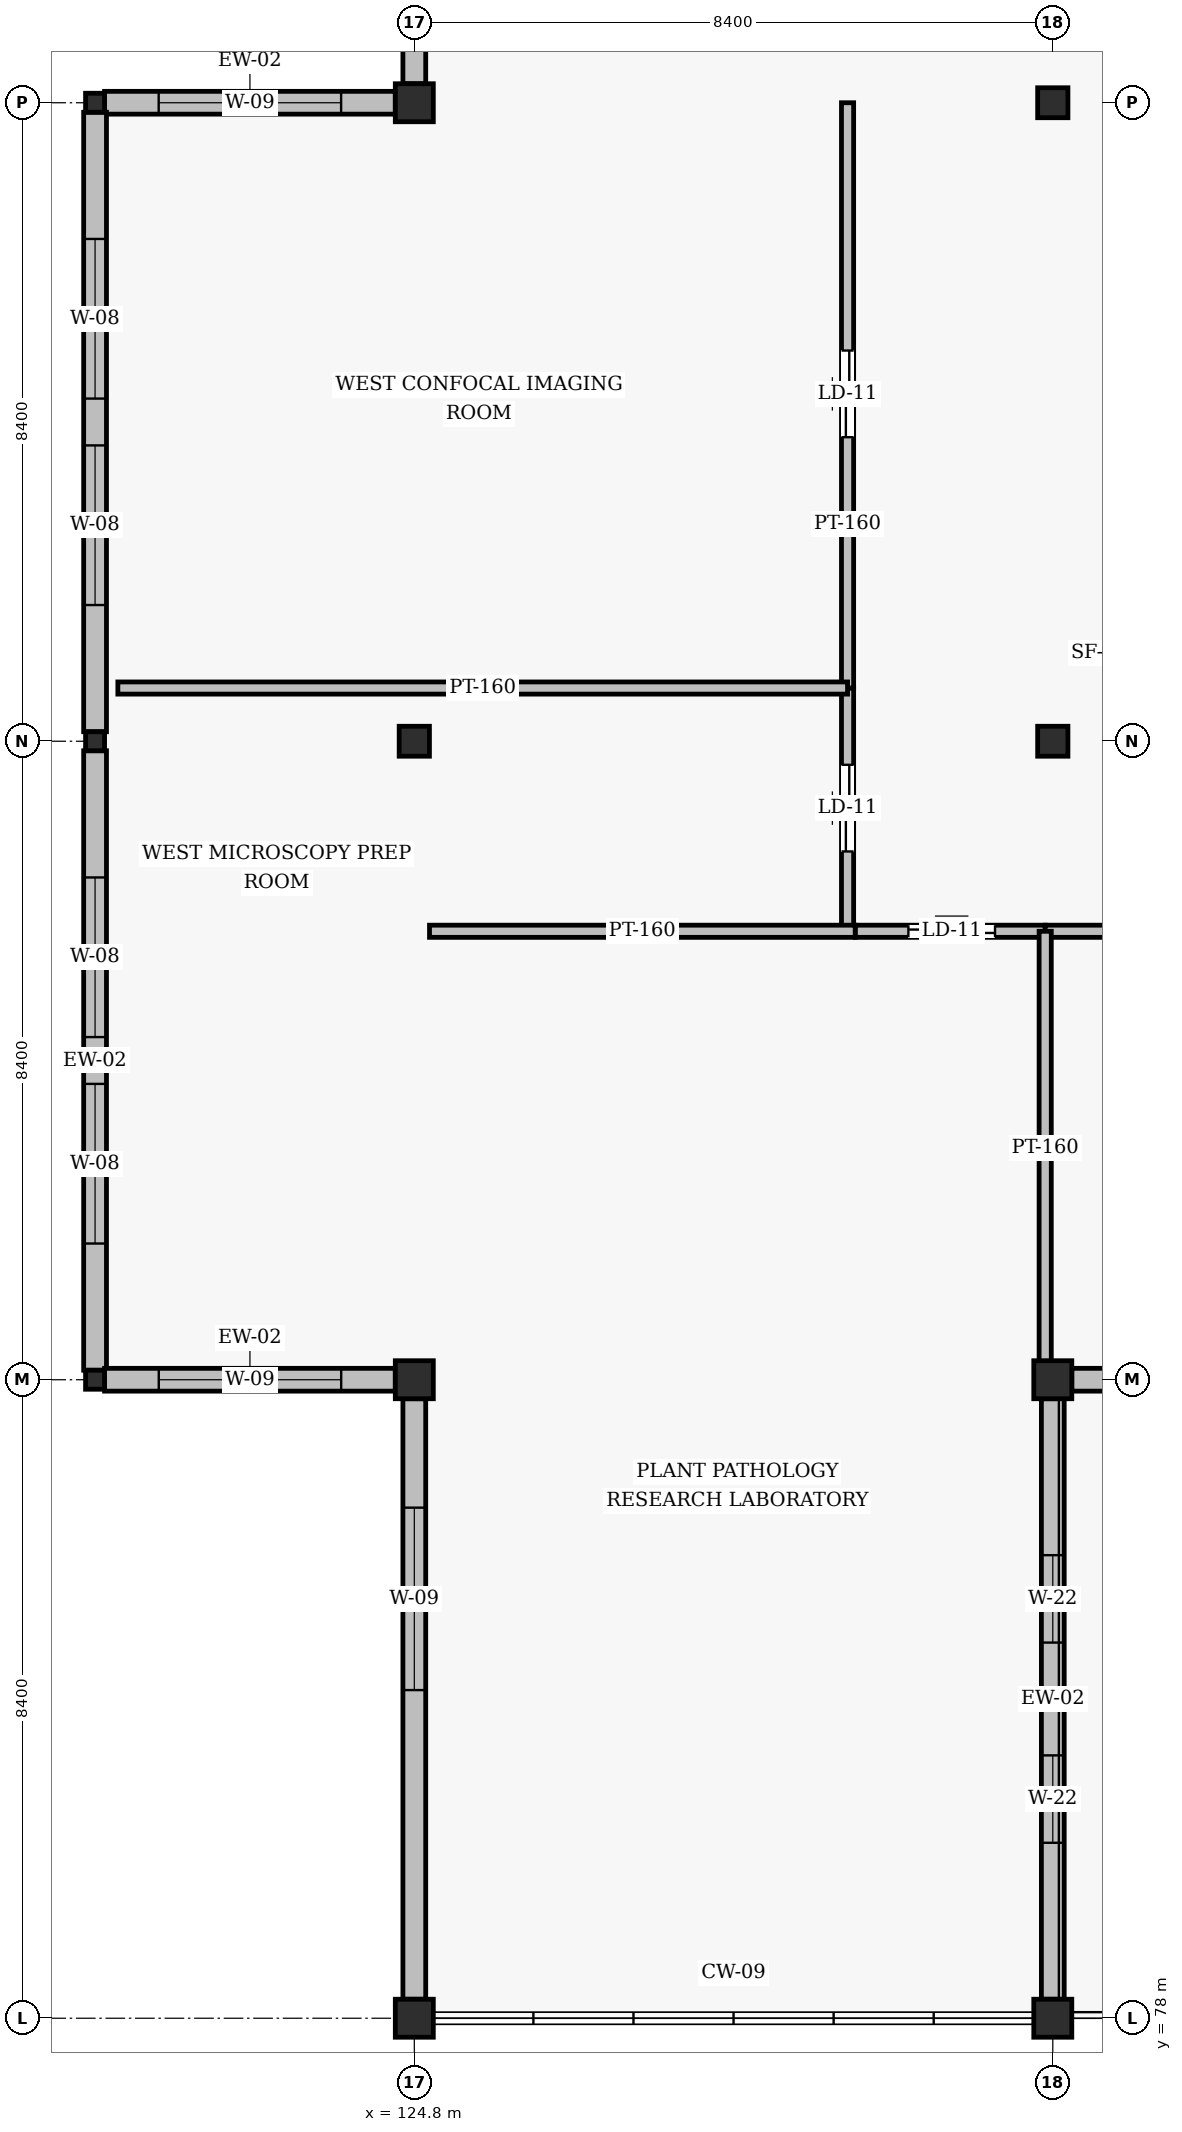
"""IFC4 building model, lengths in metres.
Left out: names, types, materials, properties, quantities, classifications, styles, units other than length and angle.
Written with IfcOpenShell. Run it as: python <this file> out.ifc"""

import sys

from ifc_helpers import new_model, si_unit, direction, frame, frame_2d, origin, origin_2d, place, context, subcontext, project, spatial, rectangle, hollow_rectangle, i_section, extrude, element, fill, save


model = new_model("IFC4")
c1 = context("Model", 3, precision=1e-05, world=origin(), true_north=direction((0.0, 1.0)))
c2 = subcontext(c1, "Body", "Model", "MODEL_VIEW")
j1 = project(units=[si_unit("LENGTHUNIT", "METRE"), si_unit("PLANEANGLEUNIT", "RADIAN")], contexts=[c1])
p1 = place(None, origin())
s1 = spatial("IfcSite", under=j1, at=p1, CompositionType="ELEMENT")
p2 = place(p1, origin())
s2 = spatial("IfcBuilding", under=s1, at=p2, CompositionType="ELEMENT")
p3 = place(p2, frame((0.0, 0.0, 28.2)))
s3 = spatial("IfcBuildingStorey", under=s2, at=p3, CompositionType="ELEMENT", Elevation=28.2)
for number, where, z_axis, x_axis in (
    (1, (120.6, 86.4, 0.0), (0.0, 0.0, 1.0), (1.0, 0.0, 0.0)),
    (2, (120.6, 94.8, 0.0), (0.0, 0.0, 1.0), (1.0, 0.0, 0.0)),
    (3, (120.6, 103.2, 0.0), (0.0, 0.0, 1.0), (1.0, 0.0, 0.0)),
):
    element("IfcColumn", number, at=place(p3, frame(where, z_axis=z_axis, x_axis=x_axis)), inside=s3, PredefinedType="COLUMN", context=c2, shape_type="SweptSolid", body=[
        extrude(i_section(OverallWidth=0.25, OverallDepth=0.25, WebThickness=0.009, FlangeThickness=0.014, FilletRadius=0.016, at=origin_2d()), origin(), (0.0, 0.0, 1.0), 3.6),
    ])
for number, where, z_axis, x_axis in (
    (4, (124.8, 78.0, 0.0), (0.0, 0.0, 1.0), (1.0, 0.0, 0.0)),
    (5, (124.8, 86.4, 0.0), (0.0, 0.0, 1.0), (1.0, 0.0, 0.0)),
):
    element("IfcColumn", number, at=place(p3, frame(where, z_axis=z_axis, x_axis=x_axis)), inside=s3, PredefinedType="COLUMN", context=c2, shape_type="SweptSolid", body=[
        extrude(hollow_rectangle(XDim=0.5, YDim=0.5, WallThickness=0.02, InnerFilletRadius=0.02, OuterFilletRadius=0.04, at=origin_2d()), origin(), (0.0, 0.0, 1.0), 3.6),
    ])
p4 = place(p3, frame((124.8, 94.8, 0.0), z_axis=(0.0, 0.0, 1.0), x_axis=(1.0, 0.0, 0.0)))
e6 = element("IfcColumn", 6, at=p4, inside=s3, PredefinedType="COLUMN", context=c2, shape_type="SweptSolid", body=[
    extrude(i_section(OverallWidth=0.398, OverallDepth=0.394, WebThickness=0.011, FlangeThickness=0.018, FilletRadius=0.022, at=origin_2d()), origin(), (0.0, 0.0, 1.0), 3.6),
])
for number, where, z_axis, x_axis in (
    (7, (124.8, 103.2, 0.0), (0.0, 0.0, 1.0), (1.0, 0.0, 0.0)),
    (8, (133.2, 78.0, 0.0), (0.0, 0.0, 1.0), (1.0, 0.0, 0.0)),
    (9, (133.2, 86.4, 0.0), (0.0, 0.0, 1.0), (1.0, 0.0, 0.0)),
):
    element("IfcColumn", number, at=place(p3, frame(where, z_axis=z_axis, x_axis=x_axis)), inside=s3, PredefinedType="COLUMN", context=c2, shape_type="SweptSolid", body=[
        extrude(hollow_rectangle(XDim=0.5, YDim=0.5, WallThickness=0.02, InnerFilletRadius=0.02, OuterFilletRadius=0.04, at=origin_2d()), origin(), (0.0, 0.0, 1.0), 3.6),
    ])
for number, where, z_axis, x_axis in (
    (10, (133.2, 94.8, 0.0), (0.0, 0.0, 1.0), (1.0, 0.0, 0.0)),
    (11, (133.2, 103.2, 0.0), (0.0, 0.0, 1.0), (1.0, 0.0, 0.0)),
):
    element("IfcColumn", number, at=place(p3, frame(where, z_axis=z_axis, x_axis=x_axis)), inside=s3, PredefinedType="COLUMN", context=c2, shape_type="SweptSolid", body=[
        extrude(i_section(OverallWidth=0.398, OverallDepth=0.394, WebThickness=0.011, FlangeThickness=0.018, FilletRadius=0.022, at=origin_2d()), origin(), (0.0, 0.0, 1.0), 3.6),
    ])
p5 = place(p3, frame((124.8, 86.15, 0.0), z_axis=(0.0, 0.0, 1.0), x_axis=(0.0, -1.0, 0.0)))
e12 = element("IfcWall", 12, at=p5, inside=s3, PredefinedType="SOLIDWALL", context=c2, shape_type="SweptSolid", body=[
    extrude(rectangle(XDim=7.9, YDim=0.3, at=frame_2d((3.95, 0.0))), origin(), (0.0, 0.0, 1.0), 2.852),
])
p6 = place(p5, frame((1.433, 0.0, 0.85)))
e13 = element("IfcOpeningElement", 13, at=p6, cuts=e12, PredefinedType="OPENING", context=c2, shape_type="SweptSolid", body=[
    extrude(rectangle(XDim=2.4, YDim=1.7, at=frame_2d((1.2, 0.85))), frame((0.0, 0.16, 0.0), z_axis=(0.0, -1.0, 0.0), x_axis=(1.0, 0.0, 0.0)), (0.0, 0.0, 1.0), 0.32),
])
p7 = place(p3, frame((133.2, 78.25, 0.0), z_axis=(0.0, 0.0, 1.0), x_axis=(0.0, 1.0, 0.0)))
e14 = element("IfcWall", 14, at=p7, inside=s3, PredefinedType="SOLIDWALL", context=c2, shape_type="SweptSolid", body=[
    extrude(rectangle(XDim=7.9, YDim=0.3, at=frame_2d((3.95, 0.0))), origin(), (0.0, 0.0, 1.0), 2.852),
])
p8 = place(p7, frame((2.058, 0.0, 0.9)))
e15 = element("IfcOpeningElement", 15, at=p8, cuts=e14, PredefinedType="OPENING", context=c2, shape_type="SweptSolid", body=[
    extrude(rectangle(XDim=1.15, YDim=1.65, at=frame_2d((0.575, 0.825))), frame((0.0, 0.16, 0.0), z_axis=(0.0, -1.0, 0.0), x_axis=(1.0, 0.0, 0.0)), (0.0, 0.0, 1.0), 0.32),
])
p9 = place(p7, frame((4.692, 0.0, 0.9)))
e16 = element("IfcOpeningElement", 16, at=p9, cuts=e14, PredefinedType="OPENING", context=c2, shape_type="SweptSolid", body=[
    extrude(rectangle(XDim=1.15, YDim=1.65, at=frame_2d((0.575, 0.825))), frame((0.0, 0.16, 0.0), z_axis=(0.0, -1.0, 0.0), x_axis=(1.0, 0.0, 0.0)), (0.0, 0.0, 1.0), 0.32),
])
p10 = place(p3, frame((133.45, 86.4, 0.0), z_axis=(0.0, 0.0, 1.0), x_axis=(1.0, 0.0, 0.0)))
e17 = element("IfcWall", 17, at=p10, inside=s3, PredefinedType="SOLIDWALL", context=c2, shape_type="SweptSolid", body=[
    extrude(rectangle(XDim=7.9, YDim=0.3, at=frame_2d((3.95, 0.0))), origin(), (0.0, 0.0, 1.0), 2.852),
])
p11 = place(p10, frame((3.275, 0.0, 0.0)))
e18 = element("IfcOpeningElement", 18, at=p11, cuts=e17, PredefinedType="OPENING", context=c2, shape_type="SweptSolid", body=[
    extrude(rectangle(XDim=1.35, YDim=2.24, at=frame_2d((0.675, 1.12))), frame((0.0, 0.16, 0.0), z_axis=(0.0, -1.0, 0.0), x_axis=(1.0, 0.0, 0.0)), (0.0, 0.0, 1.0), 0.32),
])
p12 = place(p3, frame((124.8, 114.95, 0.0), z_axis=(0.0, 0.0, 1.0), x_axis=(0.0, -1.0, 0.0)))
e19 = element("IfcWall", 19, at=p12, inside=s3, PredefinedType="SOLIDWALL", context=c2, shape_type="SweptSolid", body=[
    extrude(rectangle(XDim=11.5, YDim=0.3, at=frame_2d((5.75, 0.0))), origin(), (0.0, 0.0, 1.0), 2.56),
])
p13 = place(p3, frame((124.55, 103.2, 0.0), z_axis=(0.0, 0.0, 1.0), x_axis=(-1.0, 0.0, 0.0)))
e20 = element("IfcWall", 20, at=p13, inside=s3, PredefinedType="SOLIDWALL", context=c2, shape_type="SweptSolid", body=[
    extrude(rectangle(XDim=3.825, YDim=0.3, at=frame_2d((1.913, 0.0))), origin(), (0.0, 0.0, 1.0), 2.858),
])
p14 = place(p13, frame((0.713, 0.0, 0.85)))
e21 = element("IfcOpeningElement", 21, at=p14, cuts=e20, PredefinedType="OPENING", context=c2, shape_type="SweptSolid", body=[
    extrude(rectangle(XDim=2.4, YDim=1.71, at=frame_2d((1.2, 0.855))), frame((0.0, 0.16, 0.0), z_axis=(0.0, -1.0, 0.0), x_axis=(1.0, 0.0, 0.0)), (0.0, 0.0, 1.0), 0.32),
])
p15 = place(p3, frame((120.6, 103.075, 0.0), z_axis=(0.0, 0.0, 1.0), x_axis=(0.0, -1.0, 0.0)))
e22 = element("IfcWall", 22, at=p15, inside=s3, PredefinedType="SOLIDWALL", context=c2, shape_type="SweptSolid", body=[
    extrude(rectangle(XDim=8.15, YDim=0.3, at=frame_2d((4.075, 0.0))), origin(), (0.0, 0.0, 1.0), 2.852),
])
p16 = place(p15, frame((1.667, 0.0, 0.85)))
e23 = element("IfcOpeningElement", 23, at=p16, cuts=e22, PredefinedType="OPENING", context=c2, shape_type="SweptSolid", body=[
    extrude(rectangle(XDim=2.1, YDim=1.7, at=frame_2d((1.05, 0.85))), frame((0.0, 0.16, 0.0), z_axis=(0.0, -1.0, 0.0), x_axis=(1.0, 0.0, 0.0)), (0.0, 0.0, 1.0), 0.32),
])
p17 = place(p15, frame((4.383, 0.0, 0.85)))
e24 = element("IfcOpeningElement", 24, at=p17, cuts=e22, PredefinedType="OPENING", context=c2, shape_type="SweptSolid", body=[
    extrude(rectangle(XDim=2.1, YDim=1.7, at=frame_2d((1.05, 0.85))), frame((0.0, 0.16, 0.0), z_axis=(0.0, -1.0, 0.0), x_axis=(1.0, 0.0, 0.0)), (0.0, 0.0, 1.0), 0.32),
])
p18 = place(p3, frame((120.6, 94.675, 0.0), z_axis=(0.0, 0.0, 1.0), x_axis=(0.0, -1.0, 0.0)))
e25 = element("IfcWall", 25, at=p18, inside=s3, PredefinedType="SOLIDWALL", context=c2, shape_type="SweptSolid", body=[
    extrude(rectangle(XDim=8.15, YDim=0.3, at=frame_2d((4.075, 0.0))), origin(), (0.0, 0.0, 1.0), 2.852),
])
p19 = place(p18, frame((1.667, 0.0, 0.85)))
e26 = element("IfcOpeningElement", 26, at=p19, cuts=e25, PredefinedType="OPENING", context=c2, shape_type="SweptSolid", body=[
    extrude(rectangle(XDim=2.1, YDim=1.7, at=frame_2d((1.05, 0.85))), frame((0.0, 0.16, 0.0), z_axis=(0.0, -1.0, 0.0), x_axis=(1.0, 0.0, 0.0)), (0.0, 0.0, 1.0), 0.32),
])
p20 = place(p18, frame((4.383, 0.0, 0.85)))
e27 = element("IfcOpeningElement", 27, at=p20, cuts=e25, PredefinedType="OPENING", context=c2, shape_type="SweptSolid", body=[
    extrude(rectangle(XDim=2.1, YDim=1.7, at=frame_2d((1.05, 0.85))), frame((0.0, 0.16, 0.0), z_axis=(0.0, -1.0, 0.0), x_axis=(1.0, 0.0, 0.0)), (0.0, 0.0, 1.0), 0.32),
])
p21 = place(p3, frame((120.725, 86.4, 0.0), z_axis=(0.0, 0.0, 1.0), x_axis=(1.0, 0.0, 0.0)))
e28 = element("IfcWall", 28, at=p21, inside=s3, PredefinedType="SOLIDWALL", context=c2, shape_type="SweptSolid", body=[
    extrude(rectangle(XDim=3.825, YDim=0.3, at=frame_2d((1.913, 0.0))), origin(), (0.0, 0.0, 1.0), 2.858),
])
p22 = place(p21, frame((0.713, 0.0, 0.85)))
e29 = element("IfcOpeningElement", 29, at=p22, cuts=e28, PredefinedType="OPENING", context=c2, shape_type="SweptSolid", body=[
    extrude(rectangle(XDim=2.4, YDim=1.71, at=frame_2d((1.2, 0.855))), frame((0.0, 0.16, 0.0), z_axis=(0.0, -1.0, 0.0), x_axis=(1.0, 0.0, 0.0)), (0.0, 0.0, 1.0), 0.32),
])
p23 = place(p3, frame((130.5, 92.3, 0.0), z_axis=(0.0, 0.0, 1.0), x_axis=(0.0, 1.0, 0.0)))
e30 = element("IfcWall", 30, at=p23, inside=s3, PredefinedType="PARTITIONING", context=c2, shape_type="SweptSolid", body=[
    extrude(rectangle(XDim=3.2, YDim=0.16, at=frame_2d((1.6, 0.0))), origin(), (0.0, 0.0, 1.0), 2.856),
])
p24 = place(p23, frame((1.05, 0.0, 0.0)))
e31 = element("IfcOpeningElement", 31, at=p24, cuts=e30, PredefinedType="OPENING", context=c2, shape_type="SweptSolid", body=[
    extrude(rectangle(XDim=1.14, YDim=2.12, at=frame_2d((0.57, 1.06))), frame((0.0, 0.09, 0.0), z_axis=(0.0, -1.0, 0.0), x_axis=(1.0, 0.0, 0.0)), (0.0, 0.0, 1.0), 0.18),
])
p25 = place(p3, frame((130.5, 95.5, 0.0), z_axis=(0.0, 0.0, 1.0), x_axis=(0.0, 1.0, 0.0)))
e32 = element("IfcWall", 32, at=p25, inside=s3, PredefinedType="PARTITIONING", context=c2, shape_type="SweptSolid", body=[
    extrude(rectangle(XDim=7.7, YDim=0.16, at=frame_2d((3.85, 0.0))), origin(), (0.0, 0.0, 1.0), 3.006),
])
p26 = place(p25, frame((3.3, 0.0, 0.0)))
e33 = element("IfcOpeningElement", 33, at=p26, cuts=e32, PredefinedType="OPENING", context=c2, shape_type="SweptSolid", body=[
    extrude(rectangle(XDim=1.14, YDim=2.12, at=frame_2d((0.57, 1.06))), frame((0.0, 0.09, 0.0), z_axis=(0.0, -1.0, 0.0), x_axis=(1.0, 0.0, 0.0)), (0.0, 0.0, 1.0), 0.18),
])
p27 = place(p3, frame((120.9, 95.5, 0.0), z_axis=(0.0, 0.0, 1.0), x_axis=(1.0, 0.0, 0.0)))
e34 = element("IfcWall", 34, at=p27, inside=s3, PredefinedType="PARTITIONING", context=c2, shape_type="SweptSolid", body=[
    extrude(rectangle(XDim=9.6, YDim=0.16, at=frame_2d((4.8, 0.0))), origin(), (0.0, 0.0, 1.0), 2.852),
])
p28 = place(p3, frame((130.6, 92.3, 0.0), z_axis=(0.0, 0.0, 1.0), x_axis=(1.0, 0.0, 0.0)))
e35 = element("IfcWall", 35, at=p28, inside=s3, PredefinedType="PARTITIONING", context=c2, shape_type="SweptSolid", body=[
    extrude(rectangle(XDim=2.5, YDim=0.16, at=frame_2d((1.25, 0.0))), origin(), (0.0, 0.0, 1.0), 3.352),
])
p29 = place(p28, frame((0.7, 0.0, 0.0)))
e36 = element("IfcOpeningElement", 36, at=p29, cuts=e35, PredefinedType="OPENING", context=c2, shape_type="SweptSolid", body=[
    extrude(rectangle(XDim=1.14, YDim=2.12, at=frame_2d((0.57, 1.06))), frame((0.0, 0.09, 0.0), z_axis=(0.0, -1.0, 0.0), x_axis=(1.0, 0.0, 0.0)), (0.0, 0.0, 1.0), 0.18),
])
p30 = place(p3, frame((133.1, 92.3, 0.0), z_axis=(0.0, 0.0, 1.0), x_axis=(1.0, 0.0, 0.0)))
e37 = element("IfcWall", 37, at=p30, inside=s3, PredefinedType="PARTITIONING", context=c2, shape_type="SweptSolid", body=[
    extrude(rectangle(XDim=16.9, YDim=0.16, at=frame_2d((8.45, 0.0))), origin(), (0.0, 0.0, 1.0), 2.852),
])
p31 = place(p30, frame((7.85, 0.0, 0.0)))
e38 = element("IfcOpeningElement", 38, at=p31, cuts=e37, PredefinedType="OPENING", context=c2, shape_type="SweptSolid", body=[
    extrude(rectangle(XDim=1.25, YDim=2.12, at=frame_2d((0.625, 1.06))), frame((0.0, 0.09, 0.0), z_axis=(0.0, -1.0, 0.0), x_axis=(1.0, 0.0, 0.0)), (0.0, 0.0, 1.0), 0.18),
])
p32 = place(p3, frame((125.0, 92.3, 0.0), z_axis=(0.0, 0.0, 1.0), x_axis=(1.0, 0.0, 0.0)))
e39 = element("IfcWall", 39, at=p32, inside=s3, PredefinedType="PARTITIONING", context=c2, shape_type="SweptSolid", body=[
    extrude(rectangle(XDim=5.6, YDim=0.16, at=frame_2d((2.8, 0.0))), origin(), (0.0, 0.0, 1.0), 3.352),
])
p33 = place(p3, frame((133.1, 86.6, 0.0), z_axis=(0.0, 0.0, 1.0), x_axis=(0.0, 1.0, 0.0)))
e40 = element("IfcWall", 40, at=p33, inside=s3, PredefinedType="PARTITIONING", context=c2, shape_type="SweptSolid", body=[
    extrude(rectangle(XDim=5.7, YDim=0.16, at=frame_2d((2.85, 0.0))), origin(), (0.0, 0.0, 1.0), 2.852),
])
p34 = place(p6, origin())
e41 = element("IfcWindow", 41, at=p34, inside=s3, PartitioningType="SINGLE_PANEL", PredefinedType="WINDOW", context=c2, shape_type="SweptSolid", body=[
    extrude(rectangle(XDim=2.4, YDim=1.7, at=frame_2d((1.2, 0.85))), frame((0.0, 0.03, 0.0), z_axis=(0.0, -1.0, 0.0), x_axis=(1.0, 0.0, 0.0)), (0.0, 0.0, 1.0), 0.06),
])
fill(e13, e41)
p35 = place(p8, origin())
e42 = element("IfcWindow", 42, at=p35, inside=s3, PartitioningType="SINGLE_PANEL", PredefinedType="WINDOW", context=c2, shape_type="SweptSolid", body=[
    extrude(rectangle(XDim=1.15, YDim=1.65, at=frame_2d((0.575, 0.825))), frame((0.0, 0.03, 0.0), z_axis=(0.0, -1.0, 0.0), x_axis=(1.0, 0.0, 0.0)), (0.0, 0.0, 1.0), 0.06),
])
fill(e15, e42)
p36 = place(p9, origin())
e43 = element("IfcWindow", 43, at=p36, inside=s3, PartitioningType="SINGLE_PANEL", PredefinedType="WINDOW", context=c2, shape_type="SweptSolid", body=[
    extrude(rectangle(XDim=1.15, YDim=1.65, at=frame_2d((0.575, 0.825))), frame((0.0, 0.03, 0.0), z_axis=(0.0, -1.0, 0.0), x_axis=(1.0, 0.0, 0.0)), (0.0, 0.0, 1.0), 0.06),
])
fill(e16, e43)
p37 = place(p14, origin())
e44 = element("IfcWindow", 44, at=p37, inside=s3, PartitioningType="SINGLE_PANEL", PredefinedType="WINDOW", context=c2, shape_type="SweptSolid", body=[
    extrude(rectangle(XDim=2.4, YDim=1.71, at=frame_2d((1.2, 0.855))), frame((0.0, 0.03, 0.0), z_axis=(0.0, -1.0, 0.0), x_axis=(1.0, 0.0, 0.0)), (0.0, 0.0, 1.0), 0.06),
])
fill(e21, e44)
p38 = place(p16, origin())
e45 = element("IfcWindow", 45, at=p38, inside=s3, PartitioningType="SINGLE_PANEL", PredefinedType="WINDOW", context=c2, shape_type="SweptSolid", body=[
    extrude(rectangle(XDim=2.1, YDim=1.7, at=frame_2d((1.05, 0.85))), frame((0.0, 0.03, 0.0), z_axis=(0.0, -1.0, 0.0), x_axis=(1.0, 0.0, 0.0)), (0.0, 0.0, 1.0), 0.06),
])
fill(e23, e45)
p39 = place(p17, origin())
e46 = element("IfcWindow", 46, at=p39, inside=s3, PartitioningType="SINGLE_PANEL", PredefinedType="WINDOW", context=c2, shape_type="SweptSolid", body=[
    extrude(rectangle(XDim=2.1, YDim=1.7, at=frame_2d((1.05, 0.85))), frame((0.0, 0.03, 0.0), z_axis=(0.0, -1.0, 0.0), x_axis=(1.0, 0.0, 0.0)), (0.0, 0.0, 1.0), 0.06),
])
fill(e24, e46)
p40 = place(p19, origin())
e47 = element("IfcWindow", 47, at=p40, inside=s3, PartitioningType="SINGLE_PANEL", PredefinedType="WINDOW", context=c2, shape_type="SweptSolid", body=[
    extrude(rectangle(XDim=2.1, YDim=1.7, at=frame_2d((1.05, 0.85))), frame((0.0, 0.03, 0.0), z_axis=(0.0, -1.0, 0.0), x_axis=(1.0, 0.0, 0.0)), (0.0, 0.0, 1.0), 0.06),
])
fill(e26, e47)
p41 = place(p20, origin())
e48 = element("IfcWindow", 48, at=p41, inside=s3, PartitioningType="SINGLE_PANEL", PredefinedType="WINDOW", context=c2, shape_type="SweptSolid", body=[
    extrude(rectangle(XDim=2.1, YDim=1.7, at=frame_2d((1.05, 0.85))), frame((0.0, 0.03, 0.0), z_axis=(0.0, -1.0, 0.0), x_axis=(1.0, 0.0, 0.0)), (0.0, 0.0, 1.0), 0.06),
])
fill(e27, e48)
p42 = place(p22, origin())
e49 = element("IfcWindow", 49, at=p42, inside=s3, PartitioningType="SINGLE_PANEL", PredefinedType="WINDOW", context=c2, shape_type="SweptSolid", body=[
    extrude(rectangle(XDim=2.4, YDim=1.71, at=frame_2d((1.2, 0.855))), frame((0.0, 0.03, 0.0), z_axis=(0.0, -1.0, 0.0), x_axis=(1.0, 0.0, 0.0)), (0.0, 0.0, 1.0), 0.06),
])
fill(e29, e49)
p43 = place(p24, origin())
e50 = element("IfcDoor", 50, at=p43, inside=s3, OperationType="SINGLE_SWING_RIGHT", PredefinedType="DOOR", context=c2, shape_type="SweptSolid", body=[
    extrude(rectangle(XDim=1.14, YDim=2.12, at=frame_2d((0.57, 1.06))), frame((0.0, 0.025, 0.0), z_axis=(0.0, -1.0, 0.0), x_axis=(1.0, 0.0, 0.0)), (0.0, 0.0, 1.0), 0.05),
])
fill(e31, e50)
p44 = place(p26, origin())
e51 = element("IfcDoor", 51, at=p44, inside=s3, OperationType="SINGLE_SWING_RIGHT", PredefinedType="DOOR", context=c2, shape_type="SweptSolid", body=[
    extrude(rectangle(XDim=1.14, YDim=2.12, at=frame_2d((0.57, 1.06))), frame((0.0, 0.025, 0.0), z_axis=(0.0, -1.0, 0.0), x_axis=(1.0, 0.0, 0.0)), (0.0, 0.0, 1.0), 0.05),
])
fill(e33, e51)
p45 = place(p29, origin())
e52 = element("IfcDoor", 52, at=p45, inside=s3, OperationType="SINGLE_SWING_RIGHT", PredefinedType="DOOR", context=c2, shape_type="SweptSolid", body=[
    extrude(rectangle(XDim=1.14, YDim=2.12, at=frame_2d((0.57, 1.06))), frame((0.0, 0.025, 0.0), z_axis=(0.0, -1.0, 0.0), x_axis=(1.0, 0.0, 0.0)), (0.0, 0.0, 1.0), 0.05),
])
fill(e36, e52)
save(model, sys.argv[1])
